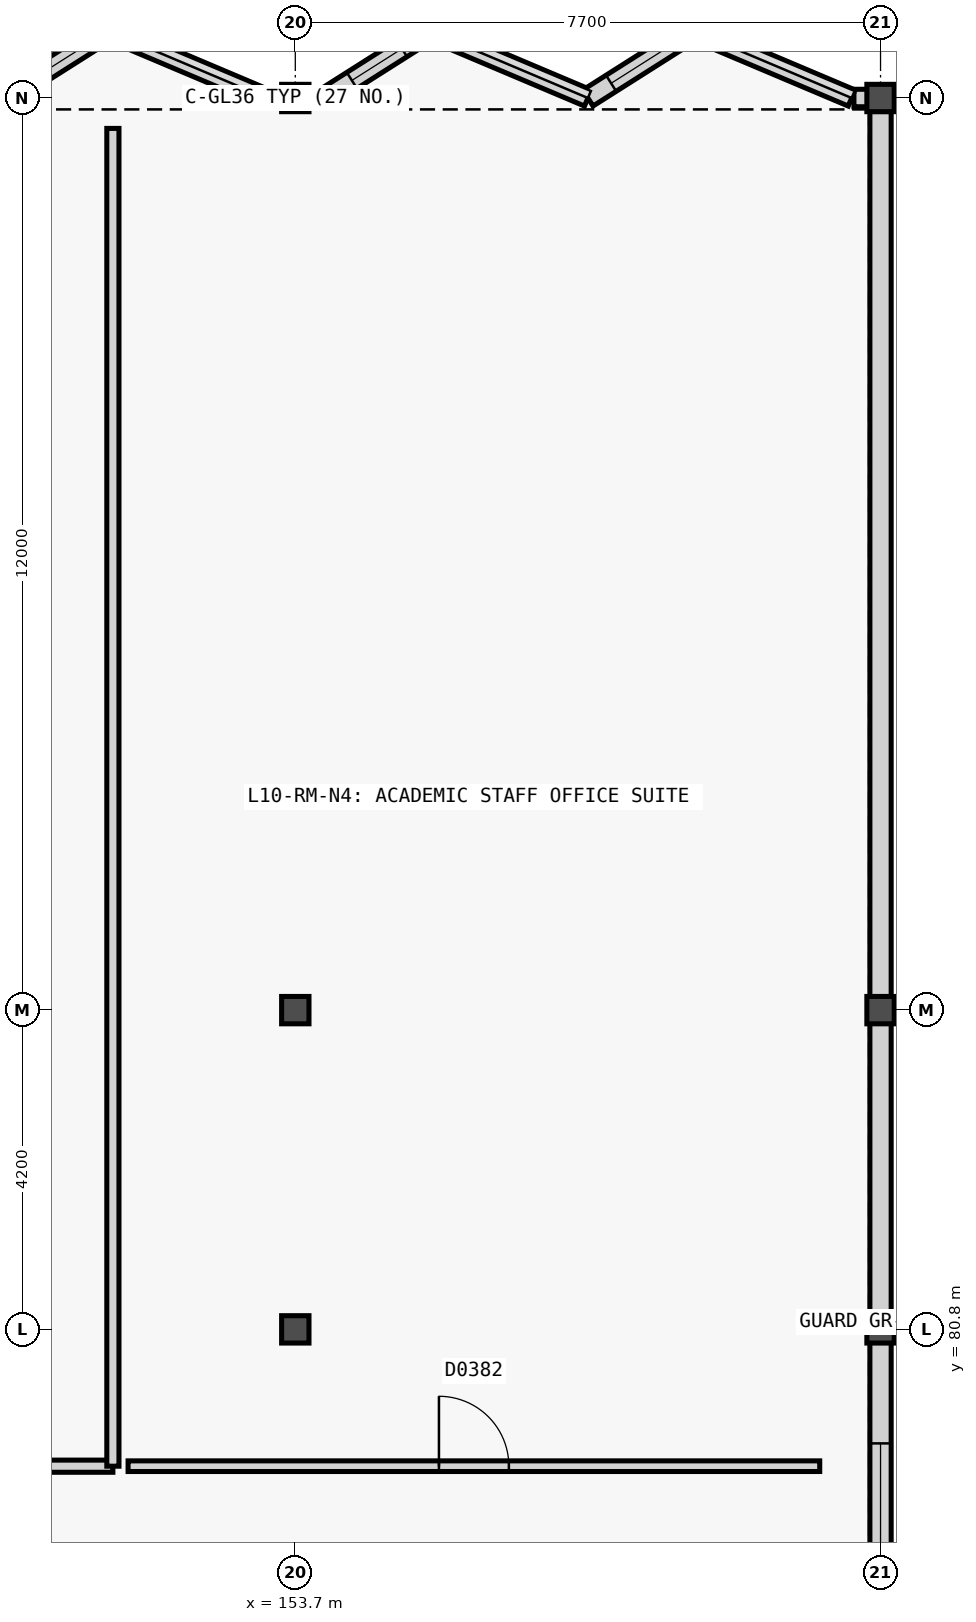
"""IFC4 building model, lengths in metres.
Left out: names, types, materials, properties, quantities, classifications, styles, units other than length and angle.
Written with IfcOpenShell. Run it as: python <this file> out.ifc"""

import sys

from ifc_helpers import new_model, si_unit, direction, frame, frame_2d, origin, origin_2d, place, context, subcontext, project, spatial, rectangle, extrude, element, fill, save


model = new_model("IFC4")
c1 = context("Model", 3, precision=1e-05, world=origin(), true_north=direction((0.0, 1.0)))
c2 = subcontext(c1, "Body", "Model", "MODEL_VIEW")
j1 = project(units=[si_unit("LENGTHUNIT", "METRE"), si_unit("PLANEANGLEUNIT", "RADIAN")], contexts=[c1])
p1 = place(None, origin())
s1 = spatial("IfcSite", under=j1, at=p1, CompositionType="ELEMENT")
p2 = place(p1, origin())
s2 = spatial("IfcBuilding", under=s1, at=p2, CompositionType="ELEMENT")
p3 = place(p2, frame((0.0, 0.0, 39.6)))
s3 = spatial("IfcBuildingStorey", under=s2, at=p3, CompositionType="ELEMENT", Elevation=39.6)
for number, where, z_axis, x_axis in (
    (1, (153.7, 80.8, 0.0), (0.0, 0.0, 1.0), (1.0, 0.0, 0.0)),
    (2, (153.7, 85.0, 0.0), (0.0, 0.0, 1.0), (1.0, 0.0, 0.0)),
    (3, (153.7, 97.0, 0.0), (0.0, 0.0, 1.0), (1.0, 0.0, 0.0)),
    (4, (161.4, 80.8, 0.0), (0.0, 0.0, 1.0), (1.0, 0.0, 0.0)),
    (5, (161.4, 85.0, 0.0), (0.0, 0.0, 1.0), (1.0, 0.0, 0.0)),
    (6, (161.4, 97.0, 0.0), (0.0, 0.0, 1.0), (1.0, 0.0, 0.0)),
):
    element("IfcColumn", number, at=place(p3, frame(where, z_axis=z_axis, x_axis=x_axis)), inside=s3, PredefinedType="COLUMN", context=c2, shape_type="SweptSolid", body=[
        extrude(rectangle(XDim=0.36, YDim=0.36, at=origin_2d()), origin(), (0.0, 0.0, 1.0), 3.6),
    ])
p4 = place(p3, frame((161.4, 96.822, 0.0), z_axis=(0.0, 0.0, 1.0), x_axis=(0.0, -1.0, 0.0)))
e7 = element("IfcWall", 7, at=p4, inside=s3, PredefinedType="SOLIDWALL", context=c2, shape_type="SweptSolid", body=[
    extrude(rectangle(XDim=32.644, YDim=0.28, at=frame_2d((16.322, 0.0))), origin(), (0.0, 0.0, 1.0), 2.79),
])
p5 = place(p4, frame((17.522, 0.0, 0.82)))
e8 = element("IfcOpeningElement", 8, at=p5, cuts=e7, PredefinedType="OPENING", context=c2, shape_type="SweptSolid", body=[
    extrude(rectangle(XDim=4.2, YDim=1.5, at=frame_2d((2.1, 0.75))), frame((0.0, 0.15, 0.0), z_axis=(0.0, -1.0, 0.0), x_axis=(1.0, 0.0, 0.0)), (0.0, 0.0, 1.0), 0.3),
])
p6 = place(p3, frame((153.35, 97.0, 0.0), z_axis=(0.0, 0.0, 1.0), x_axis=(1.0, 0.0, 0.0)))
e9 = element("IfcWall", 9, at=p6, inside=s3, PredefinedType="SOLIDWALL", context=c2, shape_type="SweptSolid", body=[
    extrude(rectangle(XDim=0.35, YDim=0.23, at=frame_2d((0.175, 0.0))), origin(), (0.0, 0.0, 1.0), 3.36),
])
p7 = place(p3, frame((153.7, 97.0, 0.0), z_axis=(0.0, 0.0, 1.0), x_axis=(1.0, 0.0, 0.0)))
e10 = element("IfcWall", 10, at=p7, inside=s3, PredefinedType="SOLIDWALL", context=c2, shape_type="SweptSolid", body=[
    extrude(rectangle(XDim=0.35, YDim=0.23, at=frame_2d((0.175, 0.0))), origin(), (0.0, 0.0, 1.0), 3.36),
])
p8 = place(p3, frame((161.05, 97.0, 0.0), z_axis=(0.0, 0.0, 1.0), x_axis=(1.0, 0.0, 0.0)))
e11 = element("IfcWall", 11, at=p8, inside=s3, PredefinedType="SOLIDWALL", context=c2, shape_type="SweptSolid", body=[
    extrude(rectangle(XDim=0.35, YDim=0.23, at=frame_2d((0.175, 0.0))), origin(), (0.0, 0.0, 1.0), 3.36),
])
p9 = place(p3, frame((149.85, 97.0, 0.0), z_axis=(0.0, 0.0, 1.0), x_axis=(0.844583954912, 0.535423143976, 0.0)))
e12 = element("IfcWall", 12, at=p9, inside=s3, PredefinedType="SOLIDWALL", context=c2, shape_type="SweptSolid", body=[
    extrude(rectangle(XDim=1.643, YDim=0.25, at=frame_2d((0.822, 0.0))), origin(), (0.0, 0.0, 1.0), 3.36),
])
p10 = place(p9, frame((0.297, 0.0, 0.82)))
e13 = element("IfcOpeningElement", 13, at=p10, cuts=e12, PredefinedType="OPENING", context=c2, shape_type="SweptSolid", body=[
    extrude(rectangle(XDim=1.05, YDim=1.4, at=frame_2d((0.525, 0.7))), frame((0.0, 0.135, 0.0), z_axis=(0.0, -1.0, 0.0), x_axis=(1.0, 0.0, 0.0)), (0.0, 0.0, 1.0), 0.27),
])
p11 = place(p3, frame((151.238, 97.88, 0.0), z_axis=(0.0, 0.0, 1.0), x_axis=(0.921122216024, -0.389273506866, 0.0)))
e14 = element("IfcWall", 14, at=p11, inside=s3, PredefinedType="SOLIDWALL", context=c2, shape_type="SweptSolid", body=[
    extrude(rectangle(XDim=2.26, YDim=0.23, at=frame_2d((1.13, 0.0))), origin(), (0.0, 0.0, 1.0), 3.36),
])
p12 = place(p3, frame((154.08, 97.0, 0.0), z_axis=(0.0, 0.0, 1.0), x_axis=(0.844583954912, 0.535423143976, 0.0)))
e15 = element("IfcWall", 15, at=p12, inside=s3, PredefinedType="SOLIDWALL", context=c2, shape_type="SweptSolid", body=[
    extrude(rectangle(XDim=1.643, YDim=0.25, at=frame_2d((0.822, 0.0))), origin(), (0.0, 0.0, 1.0), 3.36),
])
p13 = place(p12, frame((0.432, 0.0, 0.82)))
e16 = element("IfcOpeningElement", 16, at=p13, cuts=e15, PredefinedType="OPENING", context=c2, shape_type="SweptSolid", body=[
    extrude(rectangle(XDim=0.78, YDim=1.3, at=frame_2d((0.39, 0.65))), frame((0.0, 0.135, 0.0), z_axis=(0.0, -1.0, 0.0), x_axis=(1.0, 0.0, 0.0)), (0.0, 0.0, 1.0), 0.27),
])
p14 = place(p3, frame((155.468, 97.88, 0.0), z_axis=(0.0, 0.0, 1.0), x_axis=(0.921122216024, -0.389273506866, 0.0)))
e17 = element("IfcWall", 17, at=p14, inside=s3, PredefinedType="SOLIDWALL", context=c2, shape_type="SweptSolid", body=[
    extrude(rectangle(XDim=2.26, YDim=0.23, at=frame_2d((1.13, 0.0))), origin(), (0.0, 0.0, 1.0), 3.36),
])
p15 = place(p3, frame((157.55, 97.0, 0.0), z_axis=(0.0, 0.0, 1.0), x_axis=(0.844583954912, 0.535423143976, 0.0)))
e18 = element("IfcWall", 18, at=p15, inside=s3, PredefinedType="SOLIDWALL", context=c2, shape_type="SweptSolid", body=[
    extrude(rectangle(XDim=1.643, YDim=0.25, at=frame_2d((0.822, 0.0))), origin(), (0.0, 0.0, 1.0), 3.36),
])
p16 = place(p15, frame((0.362, 0.0, 0.82)))
e19 = element("IfcOpeningElement", 19, at=p16, cuts=e18, PredefinedType="OPENING", context=c2, shape_type="SweptSolid", body=[
    extrude(rectangle(XDim=0.92, YDim=1.38, at=frame_2d((0.46, 0.69))), frame((0.0, 0.135, 0.0), z_axis=(0.0, -1.0, 0.0), x_axis=(1.0, 0.0, 0.0)), (0.0, 0.0, 1.0), 0.27),
])
p17 = place(p3, frame((158.938, 97.88, 0.0), z_axis=(0.0, 0.0, 1.0), x_axis=(0.921122216024, -0.389273506866, 0.0)))
e20 = element("IfcWall", 20, at=p17, inside=s3, PredefinedType="SOLIDWALL", context=c2, shape_type="SweptSolid", body=[
    extrude(rectangle(XDim=2.26, YDim=0.23, at=frame_2d((1.13, 0.0))), origin(), (0.0, 0.0, 1.0), 3.36),
])
p18 = place(p3, frame((142.0, 79.0, 0.0), z_axis=(0.0, 0.0, 1.0), x_axis=(1.0, 0.0, 0.0)))
e21 = element("IfcWall", 21, at=p18, inside=s3, PredefinedType="PARTITIONING", context=c2, shape_type="SweptSolid", body=[
    extrude(rectangle(XDim=9.3, YDim=0.16, at=frame_2d((4.65, 0.0))), origin(), (0.0, 0.0, 1.0), 3.34),
])
p19 = place(p18, frame((4.125, 0.0, 0.0)))
e22 = element("IfcOpeningElement", 22, at=p19, cuts=e21, PredefinedType="OPENING", context=c2, shape_type="SweptSolid", body=[
    extrude(rectangle(XDim=1.05, YDim=2.15, at=frame_2d((0.525, 1.075))), frame((0.0, 0.09, 0.0), z_axis=(0.0, -1.0, 0.0), x_axis=(1.0, 0.0, 0.0)), (0.0, 0.0, 1.0), 0.18),
])
p20 = place(p3, frame((151.3, 79.0, 0.0), z_axis=(0.0, 0.0, 1.0), x_axis=(0.0, 1.0, 0.0)))
e23 = element("IfcWall", 23, at=p20, inside=s3, PredefinedType="PARTITIONING", context=c2, shape_type="SweptSolid", body=[
    extrude(rectangle(XDim=17.6, YDim=0.16, at=frame_2d((8.8, 0.0))), origin(), (0.0, 0.0, 1.0), 3.34),
])
p21 = place(p3, frame((151.5, 79.0, 0.0), z_axis=(0.0, 0.0, 1.0), x_axis=(1.0, 0.0, 0.0)))
e24 = element("IfcWall", 24, at=p21, inside=s3, PredefinedType="PARTITIONING", context=c2, shape_type="SweptSolid", body=[
    extrude(rectangle(XDim=9.1, YDim=0.14, at=frame_2d((4.55, 0.0))), origin(), (0.0, 0.0, 1.0), 3.34),
])
p22 = place(p21, frame((4.09, 0.0, 0.0)))
e25 = element("IfcOpeningElement", 25, at=p22, cuts=e24, PredefinedType="OPENING", context=c2, shape_type="SweptSolid", body=[
    extrude(rectangle(XDim=0.92, YDim=2.15, at=frame_2d((0.46, 1.075))), frame((0.0, 0.08, 0.0), z_axis=(0.0, -1.0, 0.0), x_axis=(1.0, 0.0, 0.0)), (0.0, 0.0, 1.0), 0.16),
])
p23 = place(p5, origin())
e26 = element("IfcWindow", 26, at=p23, inside=s3, PartitioningType="SINGLE_PANEL", PredefinedType="WINDOW", context=c2, shape_type="SweptSolid", body=[
    extrude(rectangle(XDim=4.2, YDim=1.5, at=frame_2d((2.1, 0.75))), frame((0.0, 0.03, 0.0), z_axis=(0.0, -1.0, 0.0), x_axis=(1.0, 0.0, 0.0)), (0.0, 0.0, 1.0), 0.06),
])
fill(e8, e26)
p24 = place(p10, origin())
e27 = element("IfcWindow", 27, at=p24, inside=s3, PartitioningType="SINGLE_PANEL", PredefinedType="WINDOW", context=c2, shape_type="SweptSolid", body=[
    extrude(rectangle(XDim=1.05, YDim=1.4, at=frame_2d((0.525, 0.7))), frame((0.0, 0.03, 0.0), z_axis=(0.0, -1.0, 0.0), x_axis=(1.0, 0.0, 0.0)), (0.0, 0.0, 1.0), 0.06),
])
fill(e13, e27)
p25 = place(p13, origin())
e28 = element("IfcWindow", 28, at=p25, inside=s3, PartitioningType="SINGLE_PANEL", PredefinedType="WINDOW", context=c2, shape_type="SweptSolid", body=[
    extrude(rectangle(XDim=0.78, YDim=1.3, at=frame_2d((0.39, 0.65))), frame((0.0, 0.03, 0.0), z_axis=(0.0, -1.0, 0.0), x_axis=(1.0, 0.0, 0.0)), (0.0, 0.0, 1.0), 0.06),
])
fill(e16, e28)
p26 = place(p16, origin())
e29 = element("IfcWindow", 29, at=p26, inside=s3, PartitioningType="SINGLE_PANEL", PredefinedType="WINDOW", context=c2, shape_type="SweptSolid", body=[
    extrude(rectangle(XDim=0.92, YDim=1.38, at=frame_2d((0.46, 0.69))), frame((0.0, 0.03, 0.0), z_axis=(0.0, -1.0, 0.0), x_axis=(1.0, 0.0, 0.0)), (0.0, 0.0, 1.0), 0.06),
])
fill(e19, e29)
p27 = place(p22, origin())
e30 = element("IfcDoor", 30, at=p27, inside=s3, OperationType="SINGLE_SWING_LEFT", PredefinedType="DOOR", context=c2, shape_type="SweptSolid", body=[
    extrude(rectangle(XDim=0.92, YDim=2.15, at=frame_2d((0.46, 1.075))), frame((0.0, 0.025, 0.0), z_axis=(0.0, -1.0, 0.0), x_axis=(1.0, 0.0, 0.0)), (0.0, 0.0, 1.0), 0.05),
])
fill(e25, e30)
save(model, sys.argv[1])
